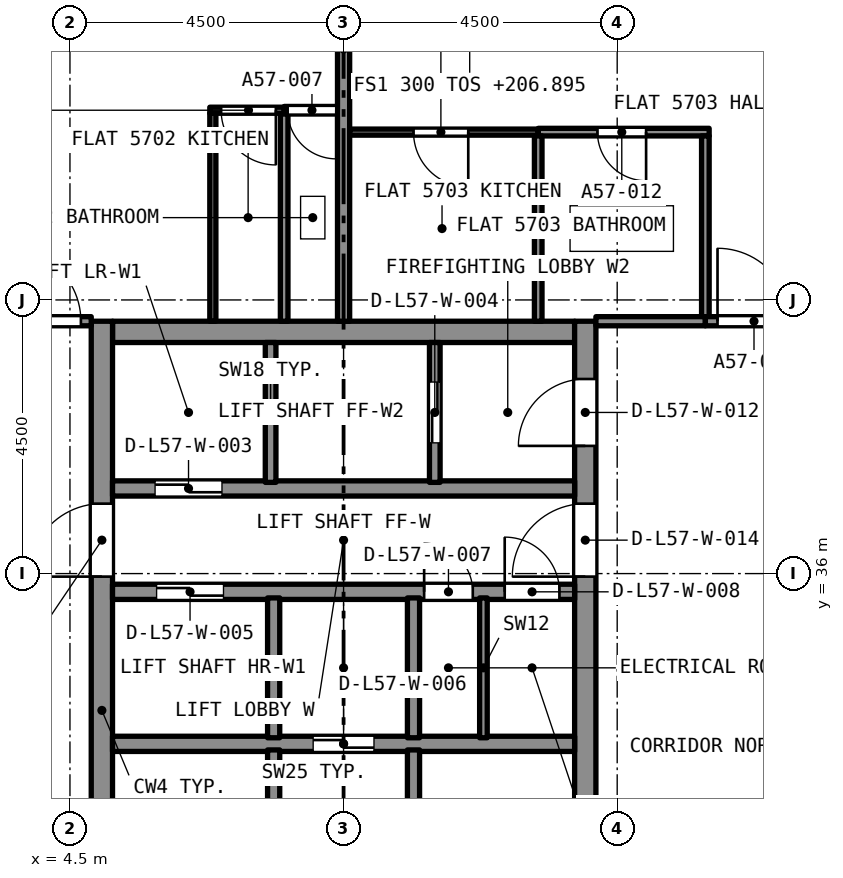
"""IFC4 building model, lengths in metres.
Left out: names, types, materials, properties, quantities, classifications, styles, units other than length and angle.
Written with IfcOpenShell. Run it as: python <this file> out.ifc"""

import sys

from ifc_helpers import new_model, si_unit, direction, frame, frame_2d, origin, place, context, subcontext, project, spatial, rectangle, extrude, element, fill, save


model = new_model("IFC4")
c1 = context("Model", 3, precision=1e-05, world=origin(), true_north=direction((0.0, 1.0)))
c2 = subcontext(c1, "Body", "Model", "MODEL_VIEW")
j1 = project(units=[si_unit("LENGTHUNIT", "METRE"), si_unit("PLANEANGLEUNIT", "RADIAN")], contexts=[c1])
p1 = place(None, origin())
s1 = spatial("IfcSite", under=j1, at=p1, CompositionType="ELEMENT")
p2 = place(p1, origin())
s2 = spatial("IfcBuilding", under=s1, at=p2, CompositionType="ELEMENT")
p3 = place(p2, frame((0.0, 0.0, 206.895)))
s3 = spatial("IfcBuildingStorey", under=s2, at=p3, CompositionType="ELEMENT", Elevation=206.895)
p4 = place(p3, frame((5.2, 39.975, 0.0), z_axis=(0.0, 0.0, 1.0), x_axis=(1.0, 0.0, 0.0)))
e1 = element("IfcWall", 1, at=p4, inside=s3, PredefinedType="SOLIDWALL", context=c2, shape_type="SweptSolid", body=[
    extrude(rectangle(XDim=7.6, YDim=0.35, at=frame_2d((3.8, 0.0))), origin(), (0.0, 0.0, 1.0), 3.2),
])
p5 = place(p3, frame((5.025, 27.35, 0.0), z_axis=(0.0, 0.0, 1.0), x_axis=(0.0, 1.0, 0.0)))
e2 = element("IfcWall", 2, at=p5, inside=s3, PredefinedType="SOLIDWALL", context=c2, shape_type="SweptSolid", body=[
    extrude(rectangle(XDim=12.8, YDim=0.35, at=frame_2d((6.4, 0.0))), origin(), (0.0, 0.0, 1.0), 3.2),
])
p6 = place(p5, frame((8.6, 0.0, 0.0)))
e3 = element("IfcOpeningElement", 3, at=p6, cuts=e2, PredefinedType="OPENING", context=c2, shape_type="SweptSolid", body=[
    extrude(rectangle(XDim=1.2, YDim=2.1, at=frame_2d((0.6, 1.05))), frame((0.0, 0.185, 0.0), z_axis=(0.0, -1.0, 0.0), x_axis=(1.0, 0.0, 0.0)), (0.0, 0.0, 1.0), 0.37),
])
p7 = place(p3, frame((12.975, 27.35, 0.0), z_axis=(0.0, 0.0, 1.0), x_axis=(0.0, 1.0, 0.0)))
e4 = element("IfcWall", 4, at=p7, inside=s3, PredefinedType="SOLIDWALL", context=c2, shape_type="SweptSolid", body=[
    extrude(rectangle(XDim=12.8, YDim=0.35, at=frame_2d((6.4, 0.0))), origin(), (0.0, 0.0, 1.0), 3.2),
])
p8 = place(p7, frame((10.75, 0.0, 0.0)))
e5 = element("IfcOpeningElement", 5, at=p8, cuts=e4, PredefinedType="OPENING", context=c2, shape_type="SweptSolid", body=[
    extrude(rectangle(XDim=1.1, YDim=2.1, at=frame_2d((0.55, 1.05))), frame((0.0, 0.185, 0.0), z_axis=(0.0, -1.0, 0.0), x_axis=(1.0, 0.0, 0.0)), (0.0, 0.0, 1.0), 0.37),
])
p9 = place(p7, frame((8.6, 0.0, 0.0)))
e6 = element("IfcOpeningElement", 6, at=p9, cuts=e4, PredefinedType="OPENING", context=c2, shape_type="SweptSolid", body=[
    extrude(rectangle(XDim=1.2, YDim=2.1, at=frame_2d((0.6, 1.05))), frame((0.0, 0.185, 0.0), z_axis=(0.0, -1.0, 0.0), x_axis=(1.0, 0.0, 0.0)), (0.0, 0.0, 1.0), 0.37),
])
p10 = place(p3, frame((8.9, 43.62, 0.0), z_axis=(0.0, 0.0, 1.0), x_axis=(-1.0, 0.0, 0.0)))
e7 = element("IfcWall", 7, at=p10, inside=s3, PredefinedType="PARTITIONING", context=c2, shape_type="SweptSolid", body=[
    extrude(rectangle(XDim=0.877, YDim=0.125, at=frame_2d((0.438, 0.0))), origin(), (0.0, 0.0, 1.0), 2.9),
])
p11 = place(p10, frame((0.02, 0.0, 0.0)))
e8 = element("IfcOpeningElement", 8, at=p11, cuts=e7, PredefinedType="OPENING", context=c2, shape_type="SweptSolid", body=[
    extrude(rectangle(XDim=0.8, YDim=2.1, at=frame_2d((0.4, 1.05))), frame((0.0, 0.073, 0.0), z_axis=(0.0, -1.0, 0.0), x_axis=(1.0, 0.0, 0.0)), (0.0, 0.0, 1.0), 0.145),
])
p12 = place(p3, frame((8.023, 40.15, 0.0), z_axis=(0.0, 0.0, 1.0), x_axis=(0.0, 1.0, 0.0)))
e9 = element("IfcWall", 9, at=p12, inside=s3, PredefinedType="PARTITIONING", context=c2, shape_type="SweptSolid", body=[
    extrude(rectangle(XDim=3.408, YDim=0.125, at=frame_2d((1.704, 0.0))), origin(), (0.0, 0.0, 1.0), 2.9),
])
p13 = place(p3, frame((9.0, 40.15, 0.0), z_axis=(0.0, 0.0, 1.0), x_axis=(0.0, 1.0, 0.0)))
e10 = element("IfcWall", 10, at=p13, inside=s3, PredefinedType="PARTITIONING", context=c2, shape_type="SweptSolid", body=[
    extrude(rectangle(XDim=8.95, YDim=0.2, at=frame_2d((4.475, 0.0))), origin(), (0.0, 0.0, 1.0), 2.9),
])
p14 = place(p3, frame((8.023, 43.62, 0.0), z_axis=(0.0, 0.0, 1.0), x_axis=(-1.0, 0.0, 0.0)))
e11 = element("IfcWall", 11, at=p14, inside=s3, PredefinedType="PARTITIONING", context=c2, shape_type="SweptSolid", body=[
    extrude(rectangle(XDim=1.223, YDim=0.1, at=frame_2d((0.611, 0.0))), origin(), (0.0, 0.0, 1.0), 2.9),
])
p15 = place(p14, frame((0.136, 0.0, 0.0)))
e12 = element("IfcOpeningElement", 12, at=p15, cuts=e11, PredefinedType="OPENING", context=c2, shape_type="SweptSolid", body=[
    extrude(rectangle(XDim=0.9, YDim=2.1, at=frame_2d((0.45, 1.05))), frame((0.0, 0.06, 0.0), z_axis=(0.0, -1.0, 0.0), x_axis=(1.0, 0.0, 0.0)), (0.0, 0.0, 1.0), 0.12),
])
p16 = place(p3, frame((6.85, 40.15, 0.0), z_axis=(0.0, 0.0, 1.0), x_axis=(0.0, 1.0, 0.0)))
e13 = element("IfcWall", 13, at=p16, inside=s3, PredefinedType="PARTITIONING", context=c2, shape_type="SweptSolid", body=[
    extrude(rectangle(XDim=3.42, YDim=0.1, at=frame_2d((1.71, 0.0))), origin(), (0.0, 0.0, 1.0), 2.9),
])
p17 = place(p3, frame((3.35, 40.15, 0.0), z_axis=(0.0, 0.0, 1.0), x_axis=(1.0, 0.0, 0.0)))
e14 = element("IfcWall", 14, at=p17, inside=s3, PredefinedType="PARTITIONING", context=c2, shape_type="SweptSolid", body=[
    extrude(rectangle(XDim=1.5, YDim=0.15, at=frame_2d((0.75, 0.0))), origin(), (0.0, 0.0, 1.0), 2.9),
])
p18 = place(p17, frame((0.13, 0.0, 0.0)))
e15 = element("IfcOpeningElement", 15, at=p18, cuts=e14, PredefinedType="OPENING", context=c2, shape_type="SweptSolid", body=[
    extrude(rectangle(XDim=1.2, YDim=2.4, at=frame_2d((0.6, 1.2))), frame((0.0, 0.085, 0.0), z_axis=(0.0, -1.0, 0.0), x_axis=(1.0, 0.0, 0.0)), (0.0, 0.0, 1.0), 0.17),
])
p19 = place(p3, frame((15.012, 43.26, 0.0), z_axis=(0.0, 0.0, 1.0), x_axis=(-1.0, 0.0, 0.0)))
e16 = element("IfcWall", 16, at=p19, inside=s3, PredefinedType="PARTITIONING", context=c2, shape_type="SweptSolid", body=[
    extrude(rectangle(XDim=2.812, YDim=0.125, at=frame_2d((1.406, 0.0))), origin(), (0.0, 0.0, 1.0), 2.9),
])
p20 = place(p19, frame((1.037, 0.0, 0.0)))
e17 = element("IfcOpeningElement", 17, at=p20, cuts=e16, PredefinedType="OPENING", context=c2, shape_type="SweptSolid", body=[
    extrude(rectangle(XDim=0.8, YDim=2.1, at=frame_2d((0.4, 1.05))), frame((0.0, 0.073, 0.0), z_axis=(0.0, -1.0, 0.0), x_axis=(1.0, 0.0, 0.0)), (0.0, 0.0, 1.0), 0.145),
])
p21 = place(p3, frame((14.95, 40.225, 0.0), z_axis=(0.0, 0.0, 1.0), x_axis=(0.0, 1.0, 0.0)))
e18 = element("IfcWall", 18, at=p21, inside=s3, PredefinedType="PARTITIONING", context=c2, shape_type="SweptSolid", body=[
    extrude(rectangle(XDim=2.972, YDim=0.125, at=frame_2d((1.486, 0.0))), origin(), (0.0, 0.0, 1.0), 2.9),
])
p22 = place(p3, frame((12.201, 40.15, 0.0), z_axis=(0.0, 0.0, 1.0), x_axis=(0.0, 1.0, 0.0)))
e19 = element("IfcWall", 19, at=p22, inside=s3, PredefinedType="PARTITIONING", context=c2, shape_type="SweptSolid", body=[
    extrude(rectangle(XDim=3.048, YDim=0.125, at=frame_2d((1.524, 0.0))), origin(), (0.0, 0.0, 1.0), 2.9),
])
p23 = place(p3, frame((13.15, 40.15, 0.0), z_axis=(0.0, 0.0, 1.0), x_axis=(1.0, 0.0, 0.0)))
e20 = element("IfcWall", 20, at=p23, inside=s3, PredefinedType="PARTITIONING", context=c2, shape_type="SweptSolid", body=[
    extrude(rectangle(XDim=1.8, YDim=0.15, at=frame_2d((0.9, 0.0))), origin(), (0.0, 0.0, 1.0), 2.9),
])
p24 = place(p3, frame((12.201, 43.26, 0.0), z_axis=(0.0, 0.0, 1.0), x_axis=(-1.0, 0.0, 0.0)))
e21 = element("IfcWall", 21, at=p24, inside=s3, PredefinedType="PARTITIONING", context=c2, shape_type="SweptSolid", body=[
    extrude(rectangle(XDim=3.101, YDim=0.1, at=frame_2d((1.55, 0.0))), origin(), (0.0, 0.0, 1.0), 2.9),
])
p25 = place(p24, frame((1.15, 0.0, 0.0)))
e22 = element("IfcOpeningElement", 22, at=p25, cuts=e21, PredefinedType="OPENING", context=c2, shape_type="SweptSolid", body=[
    extrude(rectangle(XDim=0.9, YDim=2.1, at=frame_2d((0.45, 1.05))), frame((0.0, 0.06, 0.0), z_axis=(0.0, -1.0, 0.0), x_axis=(1.0, 0.0, 0.0)), (0.0, 0.0, 1.0), 0.12),
])
p26 = place(p3, frame((14.95, 40.15, 0.0), z_axis=(0.0, 0.0, 1.0), x_axis=(1.0, 0.0, 0.0)))
e23 = element("IfcWall", 23, at=p26, inside=s3, PredefinedType="PARTITIONING", context=c2, shape_type="SweptSolid", body=[
    extrude(rectangle(XDim=2.65, YDim=0.15, at=frame_2d((1.325, 0.0))), origin(), (0.0, 0.0, 1.0), 2.9),
])
p27 = place(p26, frame((0.2, 0.0, 0.0)))
e24 = element("IfcOpeningElement", 24, at=p27, cuts=e23, PredefinedType="OPENING", context=c2, shape_type="SweptSolid", body=[
    extrude(rectangle(XDim=1.2, YDim=2.4, at=frame_2d((0.6, 1.2))), frame((0.0, 0.085, 0.0), z_axis=(0.0, -1.0, 0.0), x_axis=(1.0, 0.0, 0.0)), (0.0, 0.0, 1.0), 0.17),
])
p28 = place(p3, frame((5.2, 33.2, 0.0), z_axis=(0.0, 0.0, 1.0), x_axis=(1.0, 0.0, 0.0)))
e25 = element("IfcWall", 25, at=p28, inside=s3, PredefinedType="SOLIDWALL", context=c2, shape_type="SweptSolid", body=[
    extrude(rectangle(XDim=7.6, YDim=0.25, at=frame_2d((3.8, 0.0))), origin(), (0.0, 0.0, 1.0), 2.9),
])
p29 = place(p28, frame((3.3, 0.0, 0.0)))
e26 = element("IfcOpeningElement", 26, at=p29, cuts=e25, PredefinedType="OPENING", context=c2, shape_type="SweptSolid", body=[
    extrude(rectangle(XDim=1.0, YDim=2.1, at=frame_2d((0.5, 1.05))), frame((0.0, 0.135, 0.0), z_axis=(0.0, -1.0, 0.0), x_axis=(1.0, 0.0, 0.0)), (0.0, 0.0, 1.0), 0.27),
])
p30 = place(p3, frame((5.2, 35.7, 0.0), z_axis=(0.0, 0.0, 1.0), x_axis=(1.0, 0.0, 0.0)))
e27 = element("IfcWall", 27, at=p30, inside=s3, PredefinedType="SOLIDWALL", context=c2, shape_type="SweptSolid", body=[
    extrude(rectangle(XDim=7.6, YDim=0.25, at=frame_2d((3.8, 0.0))), origin(), (0.0, 0.0, 1.0), 2.9),
])
p31 = place(p30, frame((0.725, 0.0, 0.0)))
e28 = element("IfcOpeningElement", 28, at=p31, cuts=e27, PredefinedType="OPENING", context=c2, shape_type="SweptSolid", body=[
    extrude(rectangle(XDim=1.1, YDim=2.4, at=frame_2d((0.55, 1.2))), frame((0.0, 0.135, 0.0), z_axis=(0.0, -1.0, 0.0), x_axis=(1.0, 0.0, 0.0)), (0.0, 0.0, 1.0), 0.27),
])
p32 = place(p30, frame((5.125, 0.0, 0.0)))
e29 = element("IfcOpeningElement", 29, at=p32, cuts=e27, PredefinedType="OPENING", context=c2, shape_type="SweptSolid", body=[
    extrude(rectangle(XDim=0.8, YDim=2.1, at=frame_2d((0.4, 1.05))), frame((0.0, 0.135, 0.0), z_axis=(0.0, -1.0, 0.0), x_axis=(1.0, 0.0, 0.0)), (0.0, 0.0, 1.0), 0.27),
])
p33 = place(p30, frame((6.45, 0.0, 0.0)))
e30 = element("IfcOpeningElement", 30, at=p33, cuts=e27, PredefinedType="OPENING", context=c2, shape_type="SweptSolid", body=[
    extrude(rectangle(XDim=0.9, YDim=2.1, at=frame_2d((0.45, 1.05))), frame((0.0, 0.135, 0.0), z_axis=(0.0, -1.0, 0.0), x_axis=(1.0, 0.0, 0.0)), (0.0, 0.0, 1.0), 0.27),
])
p34 = place(p3, frame((5.2, 37.4, 0.0), z_axis=(0.0, 0.0, 1.0), x_axis=(1.0, 0.0, 0.0)))
e31 = element("IfcWall", 31, at=p34, inside=s3, PredefinedType="SOLIDWALL", context=c2, shape_type="SweptSolid", body=[
    extrude(rectangle(XDim=7.6, YDim=0.25, at=frame_2d((3.8, 0.0))), origin(), (0.0, 0.0, 1.0), 2.9),
])
p35 = place(p34, frame((0.7, 0.0, 0.0)))
e32 = element("IfcOpeningElement", 32, at=p35, cuts=e31, PredefinedType="OPENING", context=c2, shape_type="SweptSolid", body=[
    extrude(rectangle(XDim=1.1, YDim=2.4, at=frame_2d((0.55, 1.2))), frame((0.0, 0.135, 0.0), z_axis=(0.0, -1.0, 0.0), x_axis=(1.0, 0.0, 0.0)), (0.0, 0.0, 1.0), 0.27),
])
p36 = place(p3, frame((7.85, 27.7, 0.0), z_axis=(0.0, 0.0, 1.0), x_axis=(0.0, 1.0, 0.0)))
e33 = element("IfcWall", 33, at=p36, inside=s3, PredefinedType="SOLIDWALL", context=c2, shape_type="SweptSolid", body=[
    extrude(rectangle(XDim=5.4, YDim=0.2, at=frame_2d((2.7, 0.0))), origin(), (0.0, 0.0, 1.0), 2.9),
])
p37 = place(p36, frame((0.2, 0.0, 0.0)))
e34 = element("IfcOpeningElement", 34, at=p37, cuts=e33, PredefinedType="OPENING", context=c2, shape_type="SweptSolid", body=[
    extrude(rectangle(XDim=0.9, YDim=2.1, at=frame_2d((0.45, 1.05))), frame((0.0, 0.11, 0.0), z_axis=(0.0, -1.0, 0.0), x_axis=(1.0, 0.0, 0.0)), (0.0, 0.0, 1.0), 0.22),
])
p38 = place(p3, frame((10.15, 27.7, 0.0), z_axis=(0.0, 0.0, 1.0), x_axis=(0.0, 1.0, 0.0)))
e35 = element("IfcWall", 35, at=p38, inside=s3, PredefinedType="SOLIDWALL", context=c2, shape_type="SweptSolid", body=[
    extrude(rectangle(XDim=5.4, YDim=0.2, at=frame_2d((2.7, 0.0))), origin(), (0.0, 0.0, 1.0), 2.9),
])
p39 = place(p38, frame((0.2, 0.0, 0.0)))
e36 = element("IfcOpeningElement", 36, at=p39, cuts=e35, PredefinedType="OPENING", context=c2, shape_type="SweptSolid", body=[
    extrude(rectangle(XDim=0.9, YDim=2.1, at=frame_2d((0.45, 1.05))), frame((0.0, 0.11, 0.0), z_axis=(0.0, -1.0, 0.0), x_axis=(1.0, 0.0, 0.0)), (0.0, 0.0, 1.0), 0.22),
])
for number, where, z_axis, x_axis in (
    (37, (7.85, 33.3, 0.0), (0.0, 0.0, 1.0), (0.0, 1.0, 0.0)),
    (38, (10.15, 33.3, 0.0), (0.0, 0.0, 1.0), (0.0, 1.0, 0.0)),
):
    element("IfcWall", number, at=place(p3, frame(where, z_axis=z_axis, x_axis=x_axis)), inside=s3, PredefinedType="SOLIDWALL", context=c2, shape_type="SweptSolid", body=[
        extrude(rectangle(XDim=2.3, YDim=0.2, at=frame_2d((1.15, 0.0))), origin(), (0.0, 0.0, 1.0), 2.9),
    ])
p40 = place(p3, frame((7.8, 37.5, 0.0), z_axis=(0.0, 0.0, 1.0), x_axis=(0.0, 1.0, 0.0)))
e39 = element("IfcWall", 39, at=p40, inside=s3, PredefinedType="SOLIDWALL", context=c2, shape_type="SweptSolid", body=[
    extrude(rectangle(XDim=2.3, YDim=0.175, at=frame_2d((1.15, 0.0))), origin(), (0.0, 0.0, 1.0), 2.9),
])
p41 = place(p3, frame((10.5, 37.5, 0.0), z_axis=(0.0, 0.0, 1.0), x_axis=(0.0, 1.0, 0.0)))
e40 = element("IfcWall", 40, at=p41, inside=s3, PredefinedType="SOLIDWALL", context=c2, shape_type="SweptSolid", body=[
    extrude(rectangle(XDim=2.3, YDim=0.175, at=frame_2d((1.15, 0.0))), origin(), (0.0, 0.0, 1.0), 2.9),
])
p42 = place(p41, frame((0.65, 0.0, 0.0)))
e41 = element("IfcOpeningElement", 41, at=p42, cuts=e40, PredefinedType="OPENING", context=c2, shape_type="SweptSolid", body=[
    extrude(rectangle(XDim=1.0, YDim=2.1, at=frame_2d((0.5, 1.05))), frame((0.0, 0.097, 0.0), z_axis=(0.0, -1.0, 0.0), x_axis=(1.0, 0.0, 0.0)), (0.0, 0.0, 1.0), 0.195),
])
p43 = place(p3, frame((11.3, 33.3, 0.0), z_axis=(0.0, 0.0, 1.0), x_axis=(0.0, 1.0, 0.0)))
e42 = element("IfcWall", 42, at=p43, inside=s3, PredefinedType="PARTITIONING", context=c2, shape_type="SweptSolid", body=[
    extrude(rectangle(XDim=2.3, YDim=0.125, at=frame_2d((1.15, 0.0))), origin(), (0.0, 0.0, 1.0), 2.9),
])
p44 = place(p11, origin())
e43 = element("IfcDoor", 43, at=p44, inside=s3, OperationType="SINGLE_SWING_LEFT", PredefinedType="DOOR", context=c2, shape_type="SweptSolid", body=[
    extrude(rectangle(XDim=0.8, YDim=2.1, at=frame_2d((0.4, 1.05))), frame((0.0, 0.025, 0.0), z_axis=(0.0, -1.0, 0.0), x_axis=(1.0, 0.0, 0.0)), (0.0, 0.0, 1.0), 0.05),
])
fill(e8, e43)
p45 = place(p15, origin())
e44 = element("IfcDoor", 44, at=p45, inside=s3, OperationType="SINGLE_SWING_LEFT", PredefinedType="DOOR", context=c2, shape_type="SweptSolid", body=[
    extrude(rectangle(XDim=0.9, YDim=2.1, at=frame_2d((0.45, 1.05))), frame((0.0, 0.025, 0.0), z_axis=(0.0, -1.0, 0.0), x_axis=(1.0, 0.0, 0.0)), (0.0, 0.0, 1.0), 0.05),
])
fill(e12, e44)
p46 = place(p18, origin())
e45 = element("IfcDoor", 45, at=p46, inside=s3, OperationType="SINGLE_SWING_LEFT", PredefinedType="DOOR", context=c2, shape_type="SweptSolid", body=[
    extrude(rectangle(XDim=1.2, YDim=2.4, at=frame_2d((0.6, 1.2))), frame((0.0, 0.025, 0.0), z_axis=(0.0, -1.0, 0.0), x_axis=(1.0, 0.0, 0.0)), (0.0, 0.0, 1.0), 0.05),
])
fill(e15, e45)
p47 = place(p20, origin())
e46 = element("IfcDoor", 46, at=p47, inside=s3, OperationType="SINGLE_SWING_RIGHT", PredefinedType="DOOR", context=c2, shape_type="SweptSolid", body=[
    extrude(rectangle(XDim=0.8, YDim=2.1, at=frame_2d((0.4, 1.05))), frame((0.0, 0.025, 0.0), z_axis=(0.0, -1.0, 0.0), x_axis=(1.0, 0.0, 0.0)), (0.0, 0.0, 1.0), 0.05),
])
fill(e17, e46)
p48 = place(p25, origin())
e47 = element("IfcDoor", 47, at=p48, inside=s3, OperationType="SINGLE_SWING_RIGHT", PredefinedType="DOOR", context=c2, shape_type="SweptSolid", body=[
    extrude(rectangle(XDim=0.9, YDim=2.1, at=frame_2d((0.45, 1.05))), frame((0.0, 0.025, 0.0), z_axis=(0.0, -1.0, 0.0), x_axis=(1.0, 0.0, 0.0)), (0.0, 0.0, 1.0), 0.05),
])
fill(e22, e47)
p49 = place(p27, origin())
e48 = element("IfcDoor", 48, at=p49, inside=s3, OperationType="SINGLE_SWING_LEFT", PredefinedType="DOOR", context=c2, shape_type="SweptSolid", body=[
    extrude(rectangle(XDim=1.2, YDim=2.4, at=frame_2d((0.6, 1.2))), frame((0.0, 0.025, 0.0), z_axis=(0.0, -1.0, 0.0), x_axis=(1.0, 0.0, 0.0)), (0.0, 0.0, 1.0), 0.05),
])
fill(e24, e48)
p50 = place(p35, origin())
e49 = element("IfcDoor", 49, at=p50, inside=s3, OperationType="SLIDING_TO_LEFT", PredefinedType="DOOR", context=c2, shape_type="SweptSolid", body=[
    extrude(rectangle(XDim=1.1, YDim=2.4, at=frame_2d((0.55, 1.2))), frame((0.0, 0.025, 0.0), z_axis=(0.0, -1.0, 0.0), x_axis=(1.0, 0.0, 0.0)), (0.0, 0.0, 1.0), 0.05),
])
fill(e32, e49)
p51 = place(p42, origin())
e50 = element("IfcDoor", 50, at=p51, inside=s3, OperationType="SLIDING_TO_LEFT", PredefinedType="DOOR", context=c2, shape_type="SweptSolid", body=[
    extrude(rectangle(XDim=1.0, YDim=2.1, at=frame_2d((0.5, 1.05))), frame((0.0, 0.025, 0.0), z_axis=(0.0, -1.0, 0.0), x_axis=(1.0, 0.0, 0.0)), (0.0, 0.0, 1.0), 0.05),
])
fill(e41, e50)
p52 = place(p31, origin())
e51 = element("IfcDoor", 51, at=p52, inside=s3, OperationType="SLIDING_TO_LEFT", PredefinedType="DOOR", context=c2, shape_type="SweptSolid", body=[
    extrude(rectangle(XDim=1.1, YDim=2.4, at=frame_2d((0.55, 1.2))), frame((0.0, 0.025, 0.0), z_axis=(0.0, -1.0, 0.0), x_axis=(1.0, 0.0, 0.0)), (0.0, 0.0, 1.0), 0.05),
])
fill(e28, e51)
p53 = place(p29, origin())
e52 = element("IfcDoor", 52, at=p53, inside=s3, OperationType="SLIDING_TO_LEFT", PredefinedType="DOOR", context=c2, shape_type="SweptSolid", body=[
    extrude(rectangle(XDim=1.0, YDim=2.1, at=frame_2d((0.5, 1.05))), frame((0.0, 0.025, 0.0), z_axis=(0.0, -1.0, 0.0), x_axis=(1.0, 0.0, 0.0)), (0.0, 0.0, 1.0), 0.05),
])
fill(e26, e52)
p54 = place(p32, origin())
e53 = element("IfcDoor", 53, at=p54, inside=s3, OperationType="SINGLE_SWING_LEFT", PredefinedType="DOOR", context=c2, shape_type="SweptSolid", body=[
    extrude(rectangle(XDim=0.8, YDim=2.1, at=frame_2d((0.4, 1.05))), frame((0.0, 0.025, 0.0), z_axis=(0.0, -1.0, 0.0), x_axis=(1.0, 0.0, 0.0)), (0.0, 0.0, 1.0), 0.05),
])
fill(e29, e53)
p55 = place(p33, origin())
e54 = element("IfcDoor", 54, at=p55, inside=s3, OperationType="SINGLE_SWING_LEFT", PredefinedType="DOOR", context=c2, shape_type="SweptSolid", body=[
    extrude(rectangle(XDim=0.9, YDim=2.1, at=frame_2d((0.45, 1.05))), frame((0.0, 0.025, 0.0), z_axis=(0.0, -1.0, 0.0), x_axis=(1.0, 0.0, 0.0)), (0.0, 0.0, 1.0), 0.05),
])
fill(e30, e54)
p56 = place(p8, origin())
e55 = element("IfcDoor", 55, at=p56, inside=s3, OperationType="SINGLE_SWING_LEFT", PredefinedType="DOOR", context=c2, shape_type="SweptSolid", body=[
    extrude(rectangle(XDim=1.1, YDim=2.1, at=frame_2d((0.55, 1.05))), frame((0.0, 0.025, 0.0), z_axis=(0.0, -1.0, 0.0), x_axis=(1.0, 0.0, 0.0)), (0.0, 0.0, 1.0), 0.05),
])
fill(e5, e55)
p57 = place(p6, origin())
e56 = element("IfcDoor", 56, at=p57, inside=s3, OperationType="SINGLE_SWING_LEFT", PredefinedType="DOOR", context=c2, shape_type="SweptSolid", body=[
    extrude(rectangle(XDim=1.2, YDim=2.1, at=frame_2d((0.6, 1.05))), frame((0.0, 0.025, 0.0), z_axis=(0.0, -1.0, 0.0), x_axis=(1.0, 0.0, 0.0)), (0.0, 0.0, 1.0), 0.05),
])
fill(e3, e56)
p58 = place(p9, origin())
e57 = element("IfcDoor", 57, at=p58, inside=s3, OperationType="SINGLE_SWING_LEFT", PredefinedType="DOOR", context=c2, shape_type="SweptSolid", body=[
    extrude(rectangle(XDim=1.2, YDim=2.1, at=frame_2d((0.6, 1.05))), frame((0.0, 0.025, 0.0), z_axis=(0.0, -1.0, 0.0), x_axis=(1.0, 0.0, 0.0)), (0.0, 0.0, 1.0), 0.05),
])
fill(e6, e57)
save(model, sys.argv[1])
